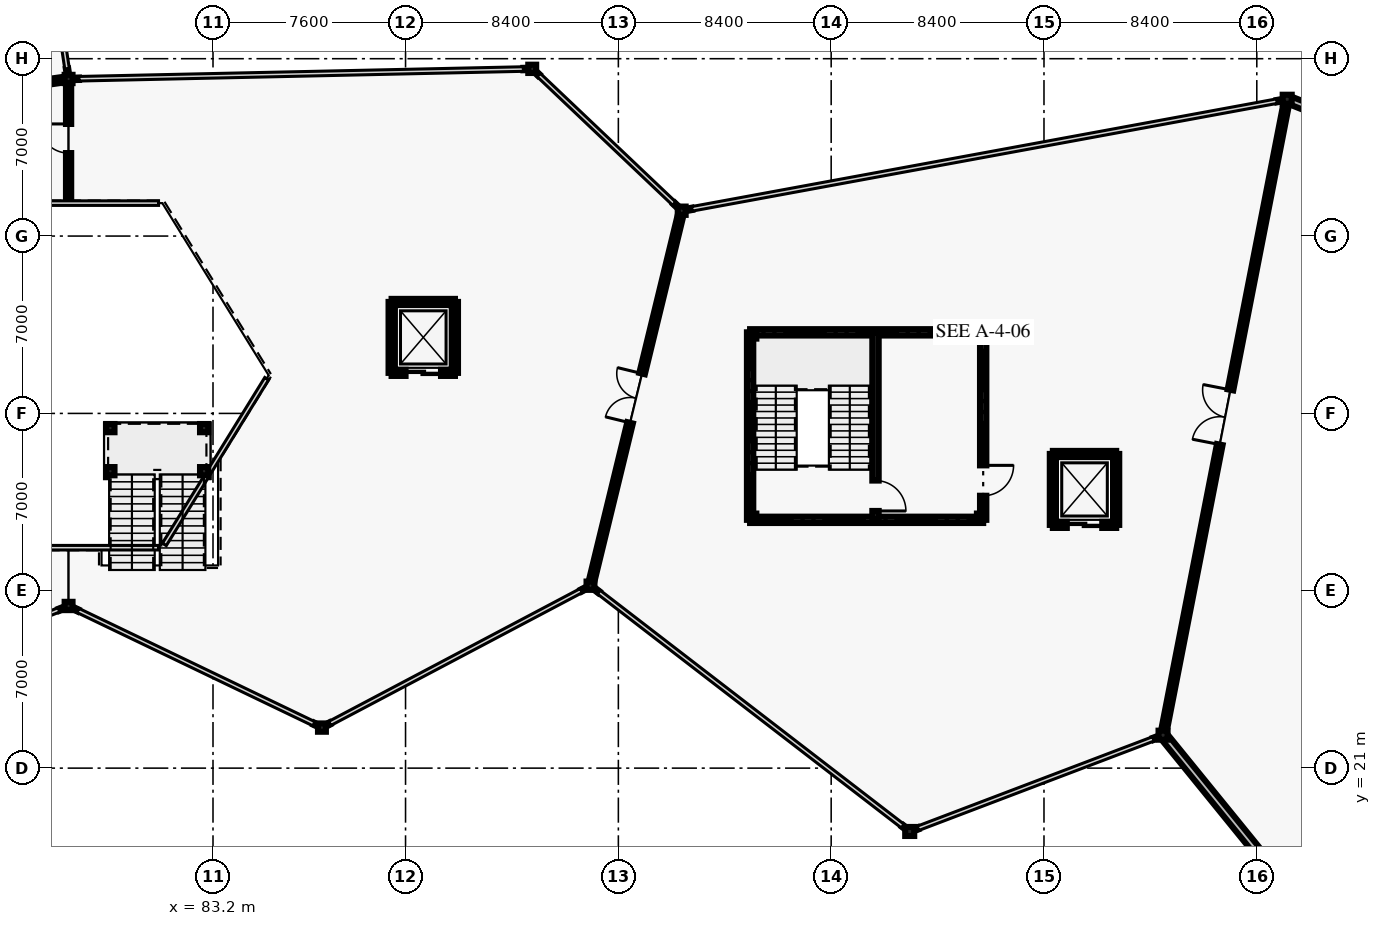
"""IFC4 building model, lengths in metres.
Left out: names, types, materials, properties, quantities, classifications, styles, units other than length and angle.
Written with IfcOpenShell. Run it as: python <this file> out.ifc"""

import sys

from ifc_helpers import new_model, si_unit, direction, frame, frame_2d, origin, origin_2d, place, context, subcontext, project, spatial, rectangle, hollow_circle, i_section, extrude, element, fill, save


model = new_model("IFC4")
c1 = context("Model", 3, precision=1e-05, world=origin(), true_north=direction((0.0, 1.0)))
c2 = subcontext(c1, "Body", "Model", "MODEL_VIEW")
j1 = project(units=[si_unit("LENGTHUNIT", "METRE"), si_unit("PLANEANGLEUNIT", "RADIAN")], contexts=[c1])
p1 = place(None, origin())
s1 = spatial("IfcSite", under=j1, at=p1, CompositionType="ELEMENT")
p2 = place(p1, origin())
s2 = spatial("IfcBuilding", under=s1, at=p2, CompositionType="ELEMENT")
p3 = place(p2, frame((0.0, 0.0, 10.2)))
s3 = spatial("IfcBuildingStorey", under=s2, at=p3, CompositionType="ELEMENT", Elevation=10.2)
for number, where, z_axis, x_axis in (
    (1, (77.5, 27.4, 0.0), (0.0, 0.0, 1.0), (1.0, 0.0, 0.0)),
    (2, (77.5, 48.2, 0.0), (0.0, 0.0, 1.0), (1.0, 0.0, 0.0)),
    (3, (87.5, 22.6, 0.0), (0.0, 0.0, 1.0), (1.0, 0.0, 0.0)),
    (4, (95.8, 48.6, 0.0), (0.0, 0.0, 1.0), (1.0, 0.0, 0.0)),
    (5, (98.1, 28.2, 0.0), (0.0, 0.0, 1.0), (1.0, 0.0, 0.0)),
    (6, (101.7, 43.0, 0.0), (0.0, 0.0, 1.0), (1.0, 0.0, 0.0)),
):
    element("IfcColumn", number, at=place(p3, frame(where, z_axis=z_axis, x_axis=x_axis)), inside=s3, PredefinedType="COLUMN", context=c2, shape_type="SweptSolid", body=[
        extrude(i_section(OverallWidth=0.311, OverallDepth=0.327, WebThickness=0.016, FlangeThickness=0.025, FilletRadius=0.017, at=origin_2d()), origin(), (0.0, 0.0, 1.0), 4.8),
    ])
for number, where, z_axis, x_axis in (
    (7, (110.7, 18.5, 0.0), (0.0, 0.0, 1.0), (1.0, 0.0, 0.0)),
    (8, (120.7, 22.3, 0.0), (0.0, 0.0, 1.0), (1.0, 0.0, 0.0)),
    (9, (125.6, 47.4, 0.0), (0.0, 0.0, 1.0), (1.0, 0.0, 0.0)),
):
    element("IfcColumn", number, at=place(p3, frame(where, z_axis=z_axis, x_axis=x_axis)), inside=s3, PredefinedType="COLUMN", context=c2, shape_type="SweptSolid", body=[
        extrude(hollow_circle(Radius=0.178, WallThickness=0.013, at=origin_2d()), origin(), (0.0, 0.0, 1.0), 4.8),
    ])
for number, where, z_axis, x_axis in (
    (10, (104.52, 30.92, 0.0), (0.0, 0.0, 1.0), (1.0, 0.0, 0.0)),
    (11, (113.48, 30.92, 0.0), (0.0, 0.0, 1.0), (1.0, 0.0, 0.0)),
    (12, (113.48, 38.08, 0.0), (0.0, 0.0, 1.0), (1.0, 0.0, 0.0)),
    (13, (104.52, 38.08, 0.0), (0.0, 0.0, 1.0), (1.0, 0.0, 0.0)),
):
    element("IfcColumn", number, at=place(p3, frame(where, z_axis=z_axis, x_axis=x_axis)), inside=s3, PredefinedType="COLUMN", context=c2, shape_type="SweptSolid", body=[
        extrude(i_section(OverallWidth=0.254, OverallDepth=0.254, WebThickness=0.009, FlangeThickness=0.014, FilletRadius=0.013, at=origin_2d()), origin(), (0.0, 0.0, 1.0), 4.8),
    ])
for number, where, z_axis, x_axis in (
    (14, (77.405, 27.362, 0.0), (0.0, 0.0, 1.0), (-0.929, -0.37, 0.0)),
    (15, (87.462, 22.618, 0.0), (0.0, 0.0, 1.0), (-0.902, 0.432, 0.0)),
):
    element("IfcWall", number, at=place(p3, frame(where, z_axis=z_axis, x_axis=x_axis)), inside=s3, PredefinedType="SOLIDWALL", context=c2, shape_type="SweptSolid", body=[
        extrude(rectangle(XDim=0.308, YDim=0.095, at=frame_2d((0.154, 0.0))), origin(), (0.0, 0.0, 1.0), 3.62),
    ])
p4 = place(p3, frame((77.87, 27.223, 0.0), z_axis=(0.0, 0.0, 1.0), x_axis=(-0.902053790555, 0.431623631126, 0.0)))
e16 = element("IfcWall", 16, at=p4, inside=s3, PredefinedType="SOLIDWALL", context=c2, shape_type="SweptSolid", body=[
    extrude(rectangle(XDim=0.308, YDim=0.095, at=frame_2d((0.154, 0.0))), origin(), (0.0, 0.0, 1.0), 3.62),
])
p5 = place(p3, frame((98.01, 28.152, 0.0), z_axis=(0.0, 0.0, 1.0), x_axis=(-0.885021600209, -0.465549962049, 0.0)))
e17 = element("IfcWall", 17, at=p5, inside=s3, PredefinedType="SOLIDWALL", context=c2, shape_type="SweptSolid", body=[
    extrude(rectangle(XDim=0.307, YDim=0.095, at=frame_2d((0.154, 0.0))), origin(), (0.0, 0.0, 1.0), 3.62),
])
p6 = place(p3, frame((87.809, 22.763, 0.0), z_axis=(0.0, 0.0, 1.0), x_axis=(-0.885348834604, -0.464927350308, 0.0)))
e18 = element("IfcWall", 18, at=p6, inside=s3, PredefinedType="SOLIDWALL", context=c2, shape_type="SweptSolid", body=[
    extrude(rectangle(XDim=0.307, YDim=0.095, at=frame_2d((0.154, 0.0))), origin(), (0.0, 0.0, 1.0), 3.62),
])
for number, where, z_axis, x_axis in (
    (19, (95.83, 48.571, 0.0), (0.0, 0.0, 1.0), (0.726, -0.688, 0.0)),
    (20, (101.403, 43.282, 0.0), (0.0, 0.0, 1.0), (0.726, -0.687, 0.0)),
):
    element("IfcWall", number, at=place(p3, frame(where, z_axis=z_axis, x_axis=x_axis)), inside=s3, PredefinedType="SOLIDWALL", context=c2, shape_type="SweptSolid", body=[
        extrude(rectangle(XDim=0.308, YDim=0.095, at=frame_2d((0.154, 0.0))), origin(), (0.0, 0.0, 1.0), 3.62),
    ])
p7 = place(p3, frame((77.602, 48.202, 0.0), z_axis=(0.0, 0.0, 1.0), x_axis=(0.999735659566, 0.022991541735, 0.0)))
e21 = element("IfcWall", 21, at=p7, inside=s3, PredefinedType="SOLIDWALL", context=c2, shape_type="SweptSolid", body=[
    extrude(rectangle(XDim=0.308, YDim=0.095, at=frame_2d((0.154, 0.0))), origin(), (0.0, 0.0, 1.0), 3.62),
])
p8 = place(p3, frame((95.45, 48.592, 0.0), z_axis=(0.0, 0.0, 1.0), x_axis=(0.999736078158, 0.022973333016, 0.0)))
e22 = element("IfcWall", 22, at=p8, inside=s3, PredefinedType="SOLIDWALL", context=c2, shape_type="SweptSolid", body=[
    extrude(rectangle(XDim=0.308, YDim=0.095, at=frame_2d((0.154, 0.0))), origin(), (0.0, 0.0, 1.0), 3.62),
])
for number, where, z_axis, x_axis in (
    (23, (77.439, 48.605, 0.0), (0.0, 0.0, 1.0), (0.15, -0.989, 0.0)),
    (24, (110.667, 18.526, 0.0), (0.0, 0.0, 1.0), (-0.794, 0.608, 0.0)),
):
    element("IfcWall", number, at=place(p3, frame(where, z_axis=z_axis, x_axis=x_axis)), inside=s3, PredefinedType="SOLIDWALL", context=c2, shape_type="SweptSolid", body=[
        extrude(rectangle(XDim=0.307, YDim=0.095, at=frame_2d((0.154, 0.0))), origin(), (0.0, 0.0, 1.0), 3.62),
    ])
p9 = place(p3, frame((98.424, 27.95, 0.0), z_axis=(0.0, 0.0, 1.0), x_axis=(-0.793861838141, 0.608098168016, 0.0)))
e25 = element("IfcWall", 25, at=p9, inside=s3, PredefinedType="SOLIDWALL", context=c2, shape_type="SweptSolid", body=[
    extrude(rectangle(XDim=0.308, YDim=0.095, at=frame_2d((0.154, 0.0))), origin(), (0.0, 0.0, 1.0), 3.62),
])
p10 = place(p3, frame((120.605, 22.264, 0.0), z_axis=(0.0, 0.0, 1.0), x_axis=(-0.935413842844, -0.353554723651, 0.0)))
e26 = element("IfcWall", 26, at=p10, inside=s3, PredefinedType="SOLIDWALL", context=c2, shape_type="SweptSolid", body=[
    extrude(rectangle(XDim=0.308, YDim=0.095, at=frame_2d((0.154, 0.0))), origin(), (0.0, 0.0, 1.0), 3.62),
])
p11 = place(p3, frame((111.027, 18.624, 0.0), z_axis=(0.0, 0.0, 1.0), x_axis=(-0.935151489811, -0.354248064361, 0.0)))
e27 = element("IfcWall", 27, at=p11, inside=s3, PredefinedType="SOLIDWALL", context=c2, shape_type="SweptSolid", body=[
    extrude(rectangle(XDim=0.308, YDim=0.095, at=frame_2d((0.154, 0.0))), origin(), (0.0, 0.0, 1.0), 3.62),
])
for number, where, z_axis, x_axis in (
    (28, (101.8, 43.019, 0.0), (0.0, 0.0, 1.0), (0.984, 0.178, 0.0)),
    (29, (125.193, 47.325, 0.0), (0.0, 0.0, 1.0), (0.984, 0.178, 0.0)),
):
    element("IfcWall", number, at=place(p3, frame(where, z_axis=z_axis, x_axis=x_axis)), inside=s3, PredefinedType="SOLIDWALL", context=c2, shape_type="SweptSolid", body=[
        extrude(rectangle(XDim=0.308, YDim=0.095, at=frame_2d((0.154, 0.0))), origin(), (0.0, 0.0, 1.0), 3.62),
    ])
p12 = place(p3, frame((125.657, 47.378, 0.0), z_axis=(0.0, 0.0, 1.0), x_axis=(0.930068974863, -0.367384950696, 0.0)))
e30 = element("IfcWall", 30, at=p12, inside=s3, PredefinedType="SOLIDWALL", context=c2, shape_type="SweptSolid", body=[
    extrude(rectangle(XDim=12.673, YDim=0.315, at=frame_2d((6.337, 0.0))), origin(), (0.0, 0.0, 1.0), 3.62),
])
p13 = place(p3, frame((131.1, 9.5, 0.0), z_axis=(0.0, 0.0, 1.0), x_axis=(-0.630603811976, 0.776104910641, 0.0)))
e31 = element("IfcWall", 31, at=p13, inside=s3, PredefinedType="SOLIDWALL", context=c2, shape_type="SweptSolid", body=[
    extrude(rectangle(XDim=16.432, YDim=0.315, at=frame_2d((8.216, 0.0))), origin(), (0.0, 0.0, 1.0), 3.62),
])
p14 = place(p3, frame((77.5, 43.5, 0.0), z_axis=(0.0, 0.0, 1.0), x_axis=(0.0, 1.0, 0.0)))
e32 = element("IfcWall", 32, at=p14, inside=s3, PredefinedType="SOLIDWALL", context=c2, shape_type="SweptSolid", body=[
    extrude(rectangle(XDim=4.7, YDim=0.205, at=frame_2d((2.35, 0.0))), origin(), (0.0, 0.0, 1.0), 3.32),
])
p15 = place(p14, frame((1.775, 0.0, 0.0)))
e33 = element("IfcOpeningElement", 33, at=p15, cuts=e32, PredefinedType="OPENING", context=c2, shape_type="SweptSolid", body=[
    extrude(rectangle(XDim=1.15, YDim=2.2, at=frame_2d((0.575, 1.1))), frame((0.0, 0.113, 0.0), z_axis=(0.0, -1.0, 0.0), x_axis=(1.0, 0.0, 0.0)), (0.0, 0.0, 1.0), 0.225),
])
p16 = place(p3, frame((77.5, 48.2, 0.0), z_axis=(0.0, 0.0, 1.0), x_axis=(-0.990181159322, -0.139790098807, 0.0)))
e34 = element("IfcWall", 34, at=p16, inside=s3, PredefinedType="SOLIDWALL", context=c2, shape_type="SweptSolid", body=[
    extrude(rectangle(XDim=15.738, YDim=0.225, at=frame_2d((7.869, 0.0))), origin(), (0.0, 0.0, 1.0), 4.02),
])
p17 = place(p16, frame((6.944, 0.0, 0.0)))
e35 = element("IfcOpeningElement", 35, at=p17, cuts=e34, PredefinedType="OPENING", context=c2, shape_type="SweptSolid", body=[
    extrude(rectangle(XDim=1.85, YDim=2.4, at=frame_2d((0.925, 1.2))), frame((0.0, 0.123, 0.0), z_axis=(0.0, -1.0, 0.0), x_axis=(1.0, 0.0, 0.0)), (0.0, 0.0, 1.0), 0.245),
])
p18 = place(p3, frame((98.1, 28.2, 0.0), z_axis=(0.0, 0.0, 1.0), x_axis=(0.236341762997, 0.971669990822, 0.0)))
e36 = element("IfcWall", 36, at=p18, inside=s3, PredefinedType="SOLIDWALL", context=c2, shape_type="SweptSolid", body=[
    extrude(rectangle(XDim=15.231, YDim=0.225, at=frame_2d((7.616, 0.0))), origin(), (0.0, 0.0, 1.0), 4.02),
])
p19 = place(p18, frame((6.616, 0.0, 0.0)))
e37 = element("IfcOpeningElement", 37, at=p19, cuts=e36, PredefinedType="OPENING", context=c2, shape_type="SweptSolid", body=[
    extrude(rectangle(XDim=2.0, YDim=2.5, at=frame_2d((1.0, 1.25))), frame((0.0, 0.123, 0.0), z_axis=(0.0, -1.0, 0.0), x_axis=(1.0, 0.0, 0.0)), (0.0, 0.0, 1.0), 0.245),
])
p20 = place(p3, frame((120.7, 22.3, 0.0), z_axis=(0.0, 0.0, 1.0), x_axis=(0.191608827438, 0.981471373626, 0.0)))
e38 = element("IfcWall", 38, at=p20, inside=s3, PredefinedType="SOLIDWALL", context=c2, shape_type="SweptSolid", body=[
    extrude(rectangle(XDim=25.574, YDim=0.225, at=frame_2d((12.787, 0.0))), origin(), (0.0, 0.0, 1.0), 4.02),
])
p21 = place(p20, frame((11.687, 0.0, 0.0)))
e39 = element("IfcOpeningElement", 39, at=p21, cuts=e38, PredefinedType="OPENING", context=c2, shape_type="SweptSolid", body=[
    extrude(rectangle(XDim=2.2, YDim=2.6, at=frame_2d((1.1, 1.3))), frame((0.0, 0.123, 0.0), z_axis=(0.0, -1.0, 0.0), x_axis=(1.0, 0.0, 0.0)), (0.0, 0.0, 1.0), 0.245),
])
p22 = place(p3, frame((104.4, 30.8, 0.0), z_axis=(0.0, 0.0, 1.0), x_axis=(0.0, 1.0, 0.0)))
e40 = element("IfcWall", 40, at=p22, inside=s3, PredefinedType="SHEAR", context=c2, shape_type="SweptSolid", body=[
    extrude(rectangle(XDim=7.4, YDim=0.25, at=frame_2d((3.7, 0.0))), origin(), (0.0, 0.0, 1.0), 4.56),
])
for number, where, z_axis, x_axis in (
    (41, (104.4, 38.2, 0.0), (0.0, 0.0, 1.0), (1.0, 0.0, 0.0)),
    (42, (113.6, 30.8, 0.0), (0.0, 0.0, 1.0), (-1.0, 0.0, 0.0)),
):
    element("IfcWall", number, at=place(p3, frame(where, z_axis=z_axis, x_axis=x_axis)), inside=s3, PredefinedType="SHEAR", context=c2, shape_type="SweptSolid", body=[
        extrude(rectangle(XDim=9.2, YDim=0.25, at=frame_2d((4.6, 0.0))), origin(), (0.0, 0.0, 1.0), 4.56),
    ])
p23 = place(p3, frame((113.6, 38.2, 0.0), z_axis=(0.0, 0.0, 1.0), x_axis=(0.0, -1.0, 0.0)))
e43 = element("IfcWall", 43, at=p23, inside=s3, PredefinedType="SHEAR", context=c2, shape_type="SweptSolid", body=[
    extrude(rectangle(XDim=7.4, YDim=0.25, at=frame_2d((3.7, 0.0))), origin(), (0.0, 0.0, 1.0), 4.56),
])
p24 = place(p23, frame((5.25, 0.0, 0.0)))
e44 = element("IfcOpeningElement", 44, at=p24, cuts=e43, PredefinedType="OPENING", context=c2, shape_type="SweptSolid", body=[
    extrude(rectangle(XDim=1.2, YDim=2.2, at=frame_2d((0.6, 1.1))), frame((0.0, 0.135, 0.0), z_axis=(0.0, -1.0, 0.0), x_axis=(1.0, 0.0, 0.0)), (0.0, 0.0, 1.0), 0.27),
])
p25 = place(p3, frame((109.35, 38.2, 0.0), z_axis=(0.0, 0.0, 1.0), x_axis=(0.0, -1.0, 0.0)))
e45 = element("IfcWall", 45, at=p25, inside=s3, PredefinedType="SHEAR", context=c2, shape_type="SweptSolid", body=[
    extrude(rectangle(XDim=7.4, YDim=0.25, at=frame_2d((3.7, 0.0))), origin(), (0.0, 0.0, 1.0), 4.56),
])
p26 = place(p25, frame((5.85, 0.0, 0.0)))
e46 = element("IfcOpeningElement", 46, at=p26, cuts=e45, PredefinedType="OPENING", context=c2, shape_type="SweptSolid", body=[
    extrude(rectangle(XDim=1.2, YDim=2.2, at=frame_2d((0.6, 1.1))), frame((0.0, 0.135, 0.0), z_axis=(0.0, -1.0, 0.0), x_axis=(1.0, 0.0, 0.0)), (0.0, 0.0, 1.0), 0.27),
])
for number, where, z_axis, x_axis in (
    (47, (79.15, 32.72, 0.0), (0.0, 0.0, 1.0), (1.0, 0.0, 0.0)),
    (48, (82.85, 32.72, 0.0), (0.0, 0.0, 1.0), (1.0, 0.0, 0.0)),
    (49, (79.15, 34.42, 0.0), (0.0, 0.0, 1.0), (1.0, 0.0, 0.0)),
    (50, (82.85, 34.42, 0.0), (0.0, 0.0, 1.0), (1.0, 0.0, 0.0)),
):
    element("IfcColumn", number, at=place(p3, frame(where, z_axis=z_axis, x_axis=x_axis)), inside=s3, PredefinedType="COLUMN", context=c2, shape_type="SweptSolid", body=[
        extrude(hollow_circle(Radius=0.162, WallThickness=0.01, at=origin_2d()), origin(), (0.0, 0.0, 1.0), 4.8),
    ])
p27 = place(p3, frame((90.25, 39.4, 0.0), z_axis=(0.0, 0.0, 1.0), x_axis=(1.0, 0.0, 0.0)))
e51 = element("IfcWall", 51, at=p27, inside=s3, PredefinedType="SHEAR", context=c2, shape_type="SweptSolid", body=[
    extrude(rectangle(XDim=2.5, YDim=0.24, at=frame_2d((1.25, 0.0))), origin(), (0.0, 0.0, 1.0), 4.56),
])
for number, where, z_axis, x_axis in (
    (52, (92.75, 39.4, 0.0), (0.0, 0.0, 1.0), (0.0, -1.0, 0.0)),
    (53, (90.25, 36.6, 0.0), (0.0, 0.0, 1.0), (0.0, 1.0, 0.0)),
):
    element("IfcWall", number, at=place(p3, frame(where, z_axis=z_axis, x_axis=x_axis)), inside=s3, PredefinedType="SHEAR", context=c2, shape_type="SweptSolid", body=[
        extrude(rectangle(XDim=2.8, YDim=0.24, at=frame_2d((1.4, 0.0))), origin(), (0.0, 0.0, 1.0), 4.56),
    ])
p28 = place(p3, frame((92.75, 36.6, 0.0), z_axis=(0.0, 0.0, 1.0), x_axis=(-1.0, 0.0, 0.0)))
e54 = element("IfcWall", 54, at=p28, inside=s3, PredefinedType="SHEAR", context=c2, shape_type="SweptSolid", body=[
    extrude(rectangle(XDim=2.5, YDim=0.24, at=frame_2d((1.25, 0.0))), origin(), (0.0, 0.0, 1.0), 4.56),
])
p29 = place(p28, frame((0.55, 0.0, 0.0)))
e55 = element("IfcOpeningElement", 55, at=p29, cuts=e54, PredefinedType="OPENING", context=c2, shape_type="SweptSolid", body=[
    extrude(rectangle(XDim=1.4, YDim=2.3, at=frame_2d((0.7, 1.15))), frame((0.0, 0.13, 0.0), z_axis=(0.0, -1.0, 0.0), x_axis=(1.0, 0.0, 0.0)), (0.0, 0.0, 1.0), 0.26),
])
p30 = place(p3, frame((116.35, 33.4, 0.0), z_axis=(0.0, 0.0, 1.0), x_axis=(1.0, 0.0, 0.0)))
e56 = element("IfcWall", 56, at=p30, inside=s3, PredefinedType="SHEAR", context=c2, shape_type="SweptSolid", body=[
    extrude(rectangle(XDim=2.5, YDim=0.24, at=frame_2d((1.25, 0.0))), origin(), (0.0, 0.0, 1.0), 4.56),
])
for number, where, z_axis, x_axis in (
    (57, (118.85, 33.4, 0.0), (0.0, 0.0, 1.0), (0.0, -1.0, 0.0)),
    (58, (116.35, 30.6, 0.0), (0.0, 0.0, 1.0), (0.0, 1.0, 0.0)),
):
    element("IfcWall", number, at=place(p3, frame(where, z_axis=z_axis, x_axis=x_axis)), inside=s3, PredefinedType="SHEAR", context=c2, shape_type="SweptSolid", body=[
        extrude(rectangle(XDim=2.8, YDim=0.24, at=frame_2d((1.4, 0.0))), origin(), (0.0, 0.0, 1.0), 4.56),
    ])
p31 = place(p3, frame((118.85, 30.6, 0.0), z_axis=(0.0, 0.0, 1.0), x_axis=(-1.0, 0.0, 0.0)))
e59 = element("IfcWall", 59, at=p31, inside=s3, PredefinedType="SHEAR", context=c2, shape_type="SweptSolid", body=[
    extrude(rectangle(XDim=2.5, YDim=0.24, at=frame_2d((1.25, 0.0))), origin(), (0.0, 0.0, 1.0), 4.56),
])
p32 = place(p31, frame((0.55, 0.0, 0.0)))
e60 = element("IfcOpeningElement", 60, at=p32, cuts=e59, PredefinedType="OPENING", context=c2, shape_type="SweptSolid", body=[
    extrude(rectangle(XDim=1.4, YDim=2.3, at=frame_2d((0.7, 1.15))), frame((0.0, 0.13, 0.0), z_axis=(0.0, -1.0, 0.0), x_axis=(1.0, 0.0, 0.0)), (0.0, 0.0, 1.0), 0.26),
])
p33 = place(p15, origin())
e61 = element("IfcDoor", 61, at=p33, inside=s3, OperationType="SINGLE_SWING_RIGHT", PredefinedType="DOOR", context=c2, shape_type="SweptSolid", body=[
    extrude(rectangle(XDim=1.15, YDim=2.2, at=frame_2d((0.575, 1.1))), frame((0.0, 0.025, 0.0), z_axis=(0.0, -1.0, 0.0), x_axis=(1.0, 0.0, 0.0)), (0.0, 0.0, 1.0), 0.05),
])
fill(e33, e61)
p34 = place(p19, origin())
e62 = element("IfcDoor", 62, at=p34, inside=s3, OperationType="DOUBLE_DOOR_SINGLE_SWING", PredefinedType="DOOR", context=c2, shape_type="SweptSolid", body=[
    extrude(rectangle(XDim=2.0, YDim=2.5, at=frame_2d((1.0, 1.25))), frame((0.0, 0.025, 0.0), z_axis=(0.0, -1.0, 0.0), x_axis=(1.0, 0.0, 0.0)), (0.0, 0.0, 1.0), 0.05),
])
fill(e37, e62)
p35 = place(p21, origin())
e63 = element("IfcDoor", 63, at=p35, inside=s3, OperationType="DOUBLE_DOOR_SINGLE_SWING", PredefinedType="DOOR", context=c2, shape_type="SweptSolid", body=[
    extrude(rectangle(XDim=2.2, YDim=2.6, at=frame_2d((1.1, 1.3))), frame((0.0, 0.025, 0.0), z_axis=(0.0, -1.0, 0.0), x_axis=(1.0, 0.0, 0.0)), (0.0, 0.0, 1.0), 0.05),
])
fill(e39, e63)
p36 = place(p24, origin())
e64 = element("IfcDoor", 64, at=p36, inside=s3, OperationType="SINGLE_SWING_LEFT", PredefinedType="DOOR", context=c2, shape_type="SweptSolid", body=[
    extrude(rectangle(XDim=1.2, YDim=2.2, at=frame_2d((0.6, 1.1))), frame((0.0, 0.025, 0.0), z_axis=(0.0, -1.0, 0.0), x_axis=(1.0, 0.0, 0.0)), (0.0, 0.0, 1.0), 0.05),
])
fill(e44, e64)
p37 = place(p26, origin())
e65 = element("IfcDoor", 65, at=p37, inside=s3, OperationType="SINGLE_SWING_RIGHT", PredefinedType="DOOR", context=c2, shape_type="SweptSolid", body=[
    extrude(rectangle(XDim=1.2, YDim=2.2, at=frame_2d((0.6, 1.1))), frame((0.0, 0.025, 0.0), z_axis=(0.0, -1.0, 0.0), x_axis=(1.0, 0.0, 0.0)), (0.0, 0.0, 1.0), 0.05),
])
fill(e46, e65)
p38 = place(p29, origin())
e66 = element("IfcDoor", 66, at=p38, inside=s3, OperationType="SLIDING_TO_LEFT", PredefinedType="DOOR", context=c2, shape_type="SweptSolid", body=[
    extrude(rectangle(XDim=1.4, YDim=2.3, at=frame_2d((0.7, 1.15))), frame((0.0, 0.025, 0.0), z_axis=(0.0, -1.0, 0.0), x_axis=(1.0, 0.0, 0.0)), (0.0, 0.0, 1.0), 0.05),
])
fill(e55, e66)
p39 = place(p32, origin())
e67 = element("IfcDoor", 67, at=p39, inside=s3, OperationType="SLIDING_TO_LEFT", PredefinedType="DOOR", context=c2, shape_type="SweptSolid", body=[
    extrude(rectangle(XDim=1.4, YDim=2.3, at=frame_2d((0.7, 1.15))), frame((0.0, 0.025, 0.0), z_axis=(0.0, -1.0, 0.0), x_axis=(1.0, 0.0, 0.0)), (0.0, 0.0, 1.0), 0.05),
])
fill(e60, e67)
save(model, sys.argv[1])
